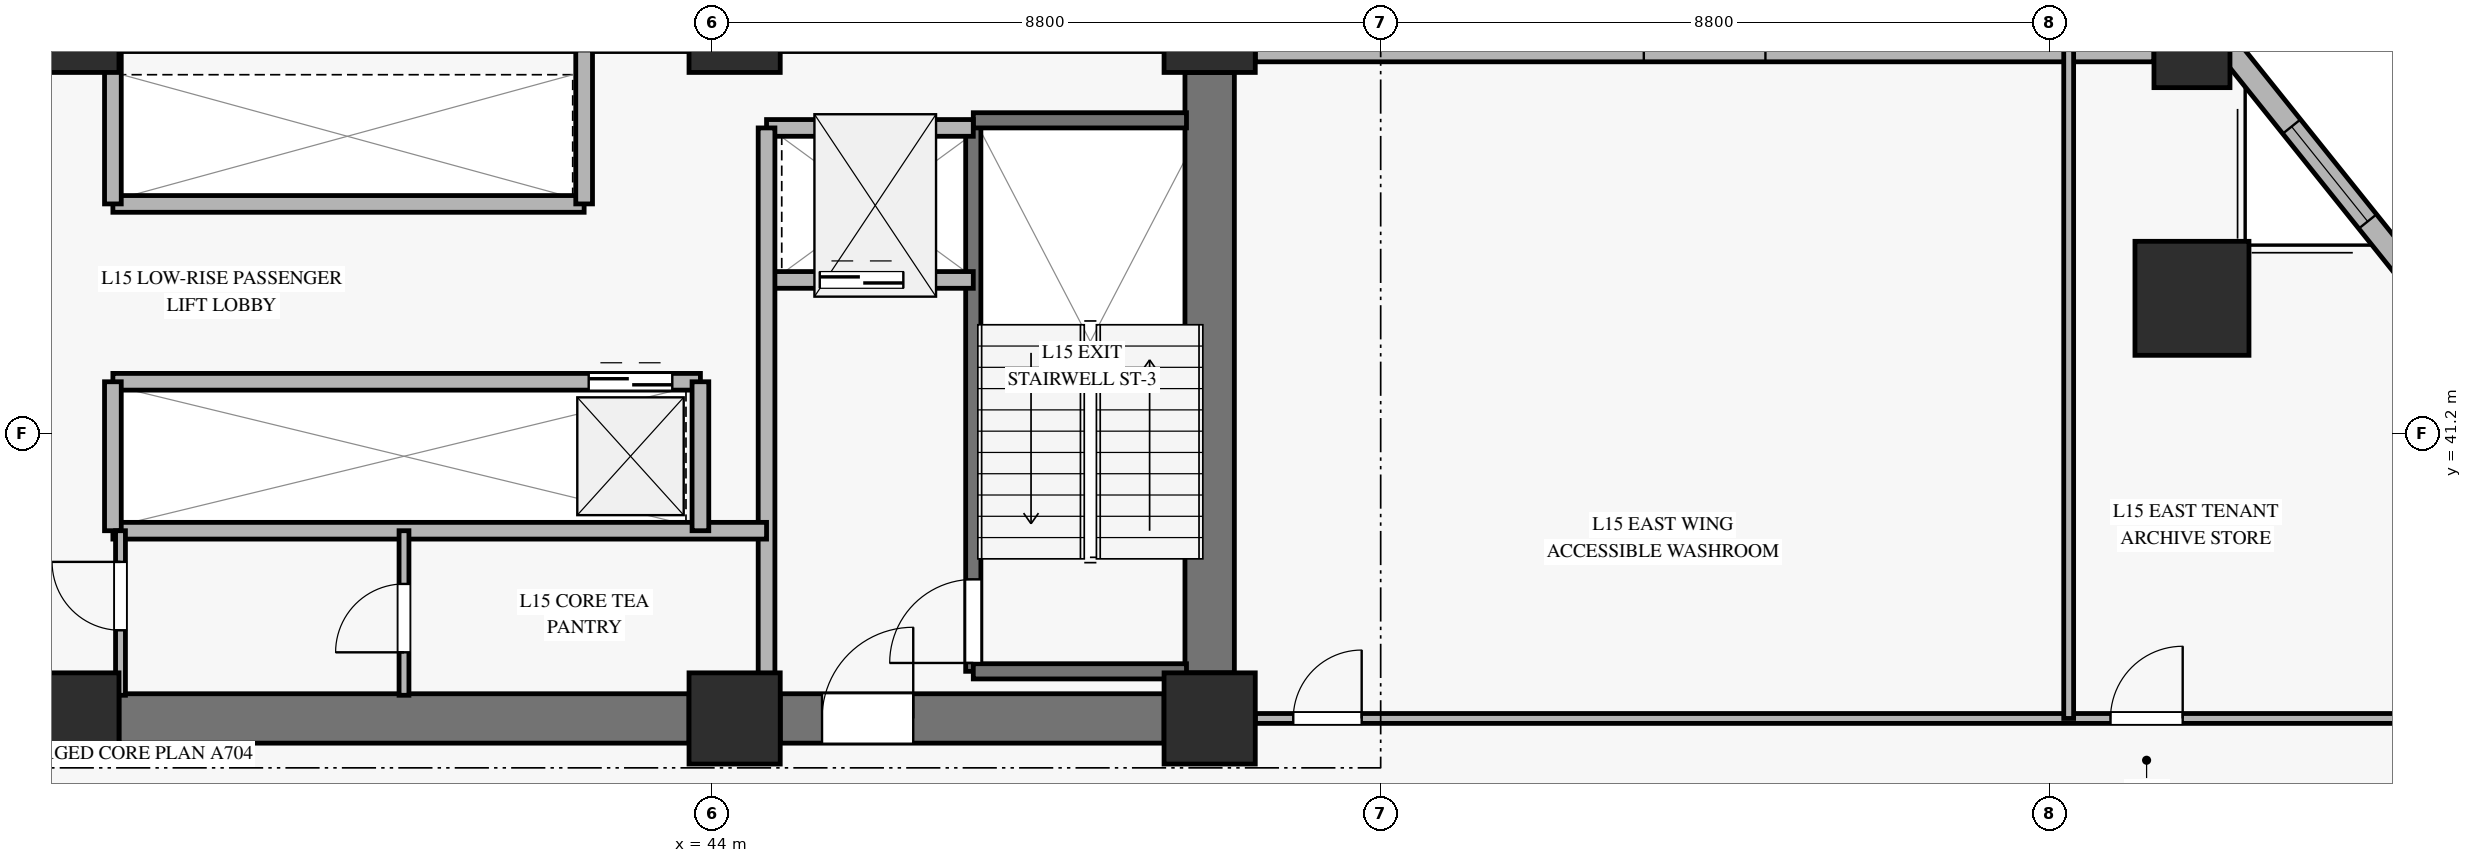
"""IFC4 building model, lengths in metres.
Left out: names, types, materials, properties, quantities, classifications, styles, units other than length and angle.
Written with IfcOpenShell. Run it as: python <this file> out.ifc"""

import sys

from ifc_helpers import new_model, si_unit, direction, frame, frame_2d, origin, origin_2d, place, context, subcontext, project, spatial, rectangle, hollow_rectangle, extrude, source, transform, mapped, element, fill, save


model = new_model("IFC4")
c1 = context("Model", 3, precision=1e-05, world=origin(), true_north=direction((0.0, 1.0)))
c2 = subcontext(c1, "Body", "Model", "MODEL_VIEW")
j1 = project(units=[si_unit("LENGTHUNIT", "METRE"), si_unit("PLANEANGLEUNIT", "RADIAN")], contexts=[c1])
p1 = place(None, origin())
s1 = spatial("IfcSite", under=j1, at=p1, CompositionType="ELEMENT")
p2 = place(p1, origin())
s2 = spatial("IfcBuilding", under=s1, at=p2, CompositionType="ELEMENT")
p3 = place(p2, frame((0.0, 0.0, 61.1)))
s3 = spatial("IfcBuildingStorey", under=s2, at=p3, CompositionType="ELEMENT", Elevation=61.1)
m1 = source(origin(), c2, "Body", "SweptSolid", [
    extrude(rectangle(XDim=1.2, YDim=1.2, at=origin_2d()), origin(), (0.0, 0.0, 1.0), 3.68),
])
for number, where, z_axis, x_axis in (
    (1, (35.6, 37.45, 0.0), (0.0, 0.0, 1.0), (1.0, 0.0, 0.0)),
    (2, (35.6, 46.55, 0.0), (0.0, 0.0, 1.0), (1.0, 0.0, 0.0)),
    (3, (44.3, 37.45, 0.0), (0.0, 0.0, 1.0), (1.0, 0.0, 0.0)),
    (4, (44.3, 46.55, 0.0), (0.0, 0.0, 1.0), (1.0, 0.0, 0.0)),
    (5, (50.55, 37.45, 0.0), (0.0, 0.0, 1.0), (1.0, 0.0, 0.0)),
    (6, (50.55, 46.55, 0.0), (0.0, 0.0, 1.0), (1.0, 0.0, 0.0)),
):
    element("IfcColumn", number, at=place(p3, frame(where, z_axis=z_axis, x_axis=x_axis)), inside=s3, PredefinedType="PILASTER", context=c2, shape_type="MappedRepresentation", body=[
        mapped(m1, transform((0.0, 0.0, 0.0), x_axis=(1.0, 0.0, 0.0), y_axis=(0.0, 1.0, 0.0), z_axis=(0.0, 0.0, 1.0), scale=1.0)),
    ])
p4 = place(p3, frame((36.2, 37.45, 0.0), z_axis=(0.0, 0.0, 1.0), x_axis=(1.0, 0.0, 0.0)))
e7 = element("IfcWall", 7, at=p4, inside=s3, PredefinedType="SHEAR", context=c2, shape_type="SweptSolid", body=[
    extrude(rectangle(XDim=7.5, YDim=0.65, at=frame_2d((3.75, 0.0))), origin(), (0.0, 0.0, 1.0), 3.68),
])
p5 = place(p3, frame((44.9, 37.45, 0.0), z_axis=(0.0, 0.0, 1.0), x_axis=(1.0, 0.0, 0.0)))
e8 = element("IfcWall", 8, at=p5, inside=s3, PredefinedType="SHEAR", context=c2, shape_type="SweptSolid", body=[
    extrude(rectangle(XDim=5.05, YDim=0.65, at=frame_2d((2.525, 0.0))), origin(), (0.0, 0.0, 1.0), 3.68),
])
p6 = place(p5, frame((0.55, 0.0, 0.0)))
e9 = element("IfcOpeningElement", 9, at=p6, cuts=e8, PredefinedType="OPENING", context=c2, shape_type="SweptSolid", body=[
    extrude(rectangle(XDim=1.2, YDim=2.15, at=frame_2d((0.6, 1.075))), frame((0.0, 0.335, 0.0), z_axis=(0.0, -1.0, 0.0), x_axis=(1.0, 0.0, 0.0)), (0.0, 0.0, 1.0), 0.67),
])
p7 = place(p3, frame((50.55, 38.05, 0.0), z_axis=(0.0, 0.0, 1.0), x_axis=(0.0, 1.0, 0.0)))
e10 = element("IfcWall", 10, at=p7, inside=s3, PredefinedType="SHEAR", context=c2, shape_type="SweptSolid", body=[
    extrude(rectangle(XDim=7.9, YDim=0.65, at=frame_2d((3.95, 0.0))), origin(), (0.0, 0.0, 1.0), 3.68),
])
m2 = source(origin(), c2, "Body", "SweptSolid", [
    extrude(hollow_rectangle(XDim=1.5, YDim=1.5, WallThickness=0.07, at=origin_2d()), origin(), (0.0, 0.0, 1.0), 3.68),
])
p8 = place(p3, frame((63.474, 42.978, 0.0), z_axis=(0.0, 0.0, 1.0), x_axis=(1.0, 0.0, 0.0)))
e11 = element("IfcColumn", 11, at=p8, inside=s3, PredefinedType="COLUMN", context=c2, shape_type="MappedRepresentation", body=[
    mapped(m2, transform((0.0, 0.0, 0.0), x_axis=(1.0, 0.0, 0.0), y_axis=(0.0, 1.0, 0.0), z_axis=(0.0, 0.0, 1.0), scale=1.0)),
])
m3 = source(origin(), c2, "Body", "SweptSolid", [
    extrude(hollow_rectangle(XDim=1.0, YDim=1.0, WallThickness=0.045, at=origin_2d()), origin(), (0.0, 0.0, 1.0), 3.68),
])
p9 = place(p3, frame((63.474, 46.25, 0.0), z_axis=(0.0, 0.0, 1.0), x_axis=(1.0, 0.0, 0.0)))
e12 = element("IfcColumn", 12, at=p9, inside=s3, PredefinedType="COLUMN", context=c2, shape_type="MappedRepresentation", body=[
    mapped(m3, transform((0.0, 0.0, 0.0), x_axis=(1.0, 0.0, 0.0), y_axis=(0.0, 1.0, 0.0), z_axis=(0.0, 0.0, 1.0), scale=1.0)),
])
p10 = place(p3, frame((51.15, 46.25, 0.0), z_axis=(0.0, 0.0, 1.0), x_axis=(1.0, 0.0, 0.0)))
e13 = element("IfcWall", 13, at=p10, inside=s3, PredefinedType="SOLIDWALL", context=c2, shape_type="SweptSolid", body=[
    extrude(rectangle(XDim=11.824, YDim=0.32, at=frame_2d((5.912, 0.0))), origin(), (0.0, 0.0, 1.0), 3.16),
])
p11 = place(p10, frame((5.112, 0.0, 0.45)))
e14 = element("IfcOpeningElement", 14, at=p11, cuts=e13, PredefinedType="OPENING", context=c2, shape_type="SweptSolid", body=[
    extrude(rectangle(XDim=1.6, YDim=2.0, at=frame_2d((0.8, 1.0))), frame((0.0, 0.17, 0.0), z_axis=(0.0, -1.0, 0.0), x_axis=(1.0, 0.0, 0.0)), (0.0, 0.0, 1.0), 0.34),
])
p12 = place(p3, frame((66.596, 42.978, 0.0), z_axis=(0.0, 0.0, 1.0), x_axis=(-0.625312639048, 0.780374335461, 0.0)))
e15 = element("IfcWall", 15, at=p12, inside=s3, PredefinedType="SOLIDWALL", context=c2, shape_type="SweptSolid", body=[
    extrude(rectangle(XDim=4.193, YDim=0.3, at=frame_2d((2.096, 0.0))), origin(), (0.0, 0.0, 1.0), 3.16),
])
p13 = place(p12, frame((1.296, 0.0, 0.45)))
e16 = element("IfcOpeningElement", 16, at=p13, cuts=e15, PredefinedType="OPENING", context=c2, shape_type="SweptSolid", body=[
    extrude(rectangle(XDim=1.6, YDim=2.0, at=frame_2d((0.8, 1.0))), frame((0.0, 0.16, 0.0), z_axis=(0.0, -1.0, 0.0), x_axis=(1.0, 0.0, 0.0)), (0.0, 0.0, 1.0), 0.32),
])
p14 = place(p3, frame((47.44, 38.07, 0.0), z_axis=(0.0, 0.0, 1.0), x_axis=(0.0, 1.0, 0.0)))
e17 = element("IfcWall", 17, at=p14, inside=s3, PredefinedType="SOLIDWALL", context=c2, shape_type="SweptSolid", body=[
    extrude(rectangle(XDim=7.25, YDim=0.2, at=frame_2d((3.625, 0.0))), origin(), (0.0, 0.0, 1.0), 3.9),
])
p15 = place(p14, frame((0.11, 0.0, 0.0)))
e18 = element("IfcOpeningElement", 18, at=p15, cuts=e17, PredefinedType="OPENING", context=c2, shape_type="SweptSolid", body=[
    extrude(rectangle(XDim=1.1, YDim=2.15, at=frame_2d((0.55, 1.075))), frame((0.0, 0.11, 0.0), z_axis=(0.0, -1.0, 0.0), x_axis=(1.0, 0.0, 0.0)), (0.0, 0.0, 1.0), 0.22),
])
for number, where, z_axis, x_axis in (
    (19, (47.44, 45.32, 0.0), (0.0, 0.0, 1.0), (1.0, 0.0, 0.0)),
    (20, (47.44, 38.07, 0.0), (0.0, 0.0, 1.0), (1.0, 0.0, 0.0)),
):
    element("IfcWall", number, at=place(p3, frame(where, z_axis=z_axis, x_axis=x_axis)), inside=s3, PredefinedType="SOLIDWALL", context=c2, shape_type="SweptSolid", body=[
        extrude(rectangle(XDim=2.805, YDim=0.2, at=frame_2d((1.403, 0.0))), origin(), (0.0, 0.0, 1.0), 3.9),
    ])
p16 = place(p3, frame((44.72, 43.22, 0.0), z_axis=(0.0, 0.0, 1.0), x_axis=(1.0, 0.0, 0.0)))
e21 = element("IfcWall", 21, at=p16, inside=s3, PredefinedType="SOLIDWALL", context=c2, shape_type="SweptSolid", body=[
    extrude(rectangle(XDim=2.72, YDim=0.22, at=frame_2d((1.36, 0.0))), origin(), (0.0, 0.0, 1.0), 3.68),
])
p17 = place(p16, frame((0.7, 0.0, 0.0)))
e22 = element("IfcOpeningElement", 22, at=p17, cuts=e21, PredefinedType="OPENING", context=c2, shape_type="SweptSolid", body=[
    extrude(rectangle(XDim=1.1, YDim=2.2, at=frame_2d((0.55, 1.1))), frame((0.0, 0.12, 0.0), z_axis=(0.0, -1.0, 0.0), x_axis=(1.0, 0.0, 0.0)), (0.0, 0.0, 1.0), 0.24),
])
p18 = place(p3, frame((44.72, 45.22, 0.0), z_axis=(0.0, 0.0, 1.0), x_axis=(1.0, 0.0, 0.0)))
e23 = element("IfcWall", 23, at=p18, inside=s3, PredefinedType="SOLIDWALL", context=c2, shape_type="SweptSolid", body=[
    extrude(rectangle(XDim=2.72, YDim=0.22, at=frame_2d((1.36, 0.0))), origin(), (0.0, 0.0, 1.0), 3.68),
])
p19 = place(p3, frame((44.72, 37.755, 0.0), z_axis=(0.0, 0.0, 1.0), x_axis=(0.0, 1.0, 0.0)))
e24 = element("IfcWall", 24, at=p19, inside=s3, PredefinedType="SOLIDWALL", context=c2, shape_type="SweptSolid", body=[
    extrude(rectangle(XDim=7.465, YDim=0.22, at=frame_2d((3.732, 0.0))), origin(), (0.0, 0.0, 1.0), 3.68),
])
p20 = place(p3, frame((36.12, 44.22, 0.0), z_axis=(0.0, 0.0, 1.0), x_axis=(1.0, 0.0, 0.0)))
e25 = element("IfcWall", 25, at=p20, inside=s3, PredefinedType="SOLIDWALL", context=c2, shape_type="SweptSolid", body=[
    extrude(rectangle(XDim=6.2, YDim=0.22, at=frame_2d((3.1, 0.0))), origin(), (0.0, 0.0, 1.0), 3.68),
])
for number, where, z_axis, x_axis in (
    (26, (36.12, 44.22, 0.0), (0.0, 0.0, 1.0), (0.0, 1.0, 0.0)),
    (27, (42.32, 44.22, 0.0), (0.0, 0.0, 1.0), (0.0, 1.0, 0.0)),
):
    element("IfcWall", number, at=place(p3, frame(where, z_axis=z_axis, x_axis=x_axis)), inside=s3, PredefinedType="SOLIDWALL", context=c2, shape_type="SweptSolid", body=[
        extrude(rectangle(XDim=2.025, YDim=0.22, at=frame_2d((1.013, 0.0))), origin(), (0.0, 0.0, 1.0), 3.68),
    ])
p21 = place(p3, frame((36.12, 41.88, 0.0), z_axis=(0.0, 0.0, 1.0), x_axis=(1.0, 0.0, 0.0)))
e28 = element("IfcWall", 28, at=p21, inside=s3, PredefinedType="SOLIDWALL", context=c2, shape_type="SweptSolid", body=[
    extrude(rectangle(XDim=7.73, YDim=0.22, at=frame_2d((3.865, 0.0))), origin(), (0.0, 0.0, 1.0), 3.68),
])
p22 = place(p21, frame((6.26, 0.0, 0.0)))
e29 = element("IfcOpeningElement", 29, at=p22, cuts=e28, PredefinedType="OPENING", context=c2, shape_type="SweptSolid", body=[
    extrude(rectangle(XDim=1.1, YDim=2.2, at=frame_2d((0.55, 1.1))), frame((0.0, 0.12, 0.0), z_axis=(0.0, -1.0, 0.0), x_axis=(1.0, 0.0, 0.0)), (0.0, 0.0, 1.0), 0.24),
])
p23 = place(p3, frame((36.12, 39.92, 0.0), z_axis=(0.0, 0.0, 1.0), x_axis=(1.0, 0.0, 0.0)))
e30 = element("IfcWall", 30, at=p23, inside=s3, PredefinedType="SOLIDWALL", context=c2, shape_type="SweptSolid", body=[
    extrude(rectangle(XDim=8.6, YDim=0.22, at=frame_2d((4.3, 0.0))), origin(), (0.0, 0.0, 1.0), 2.965),
])
for number, where, z_axis, x_axis in (
    (31, (36.12, 39.92, 0.0), (0.0, 0.0, 1.0), (0.0, 1.0, 0.0)),
    (32, (43.85, 39.92, 0.0), (0.0, 0.0, 1.0), (0.0, 1.0, 0.0)),
):
    element("IfcWall", number, at=place(p3, frame(where, z_axis=z_axis, x_axis=x_axis)), inside=s3, PredefinedType="SOLIDWALL", context=c2, shape_type="SweptSolid", body=[
        extrude(rectangle(XDim=1.96, YDim=0.22, at=frame_2d((0.98, 0.0))), origin(), (0.0, 0.0, 1.0), 3.68),
    ])
p24 = place(p3, frame((36.22, 37.755, 0.0), z_axis=(0.0, 0.0, 1.0), x_axis=(0.0, 1.0, 0.0)))
e33 = element("IfcWall", 33, at=p24, inside=s3, PredefinedType="PARTITIONING", context=c2, shape_type="SweptSolid", body=[
    extrude(rectangle(XDim=2.165, YDim=0.13, at=frame_2d((1.083, 0.0))), origin(), (0.0, 0.0, 1.0), 3.68),
])
p25 = place(p24, frame((0.855, 0.0, 0.0)))
e34 = element("IfcOpeningElement", 34, at=p25, cuts=e33, PredefinedType="OPENING", context=c2, shape_type="SweptSolid", body=[
    extrude(rectangle(XDim=0.9, YDim=2.1, at=frame_2d((0.45, 1.05))), frame((0.0, 0.075, 0.0), z_axis=(0.0, -1.0, 0.0), x_axis=(1.0, 0.0, 0.0)), (0.0, 0.0, 1.0), 0.15),
])
p26 = place(p3, frame((39.95, 37.755, 0.0), z_axis=(0.0, 0.0, 1.0), x_axis=(0.0, 1.0, 0.0)))
e35 = element("IfcWall", 35, at=p26, inside=s3, PredefinedType="PARTITIONING", context=c2, shape_type="SweptSolid", body=[
    extrude(rectangle(XDim=2.165, YDim=0.13, at=frame_2d((1.083, 0.0))), origin(), (0.0, 0.0, 1.0), 3.68),
])
p27 = place(p26, frame((0.565, 0.0, 0.0)))
e36 = element("IfcOpeningElement", 36, at=p27, cuts=e35, PredefinedType="OPENING", context=c2, shape_type="SweptSolid", body=[
    extrude(rectangle(XDim=0.9, YDim=2.1, at=frame_2d((0.45, 1.05))), frame((0.0, 0.075, 0.0), z_axis=(0.0, -1.0, 0.0), x_axis=(1.0, 0.0, 0.0)), (0.0, 0.0, 1.0), 0.15),
])
p28 = place(p3, frame((51.15, 37.45, 0.0), z_axis=(0.0, 0.0, 1.0), x_axis=(1.0, 0.0, 0.0)))
e37 = element("IfcWall", 37, at=p28, inside=s3, PredefinedType="PARTITIONING", context=c2, shape_type="SweptSolid", body=[
    extrude(rectangle(XDim=15.446, YDim=0.13, at=frame_2d((7.723, 0.0))), origin(), (0.0, 0.0, 1.0), 3.165),
])
p29 = place(p28, frame((0.5, 0.0, 0.0)))
e38 = element("IfcOpeningElement", 38, at=p29, cuts=e37, PredefinedType="OPENING", context=c2, shape_type="SweptSolid", body=[
    extrude(rectangle(XDim=0.9, YDim=2.1, at=frame_2d((0.45, 1.05))), frame((0.0, 0.075, 0.0), z_axis=(0.0, -1.0, 0.0), x_axis=(1.0, 0.0, 0.0)), (0.0, 0.0, 1.0), 0.15),
])
p30 = place(p28, frame((11.252, 0.0, 0.0)))
e39 = element("IfcOpeningElement", 39, at=p30, cuts=e37, PredefinedType="OPENING", context=c2, shape_type="SweptSolid", body=[
    extrude(rectangle(XDim=0.95, YDim=2.1, at=frame_2d((0.475, 1.05))), frame((0.0, 0.075, 0.0), z_axis=(0.0, -1.0, 0.0), x_axis=(1.0, 0.0, 0.0)), (0.0, 0.0, 1.0), 0.15),
])
p31 = place(p3, frame((61.852, 37.45, 0.0), z_axis=(0.0, 0.0, 1.0), x_axis=(0.0, 1.0, 0.0)))
e40 = element("IfcWall", 40, at=p31, inside=s3, PredefinedType="PARTITIONING", context=c2, shape_type="SweptSolid", body=[
    extrude(rectangle(XDim=8.8, YDim=0.13, at=frame_2d((4.4, 0.0))), origin(), (0.0, 0.0, 1.0), 3.68),
])
m4 = source(origin(), c2, "Body", "SweptSolid", [
    extrude(rectangle(XDim=1.6, YDim=2.0, at=frame_2d((0.8, 1.0))), frame((0.0, 0.03, 0.0), z_axis=(0.0, -1.0, 0.0), x_axis=(1.0, 0.0, 0.0)), (0.0, 0.0, 1.0), 0.06),
])
p32 = place(p13, origin())
e41 = element("IfcWindow", 41, at=p32, inside=s3, PartitioningType="SINGLE_PANEL", PredefinedType="WINDOW", context=c2, shape_type="MappedRepresentation", body=[
    mapped(m4, transform((0.0, 0.0, 0.0), x_axis=(1.0, 0.0, 0.0), y_axis=(0.0, 1.0, 0.0), z_axis=(0.0, 0.0, 1.0), scale=1.0)),
])
fill(e16, e41)
m5 = source(origin(), c2, "Body", "SweptSolid", [
    extrude(rectangle(XDim=1.1, YDim=2.15, at=frame_2d((0.55, 1.075))), frame((0.0, 0.025, 0.0), z_axis=(0.0, -1.0, 0.0), x_axis=(1.0, 0.0, 0.0)), (0.0, 0.0, 1.0), 0.05),
])
p33 = place(p15, origin())
e42 = element("IfcDoor", 42, at=p33, inside=s3, OperationType="SINGLE_SWING_LEFT", PredefinedType="DOOR", context=c2, shape_type="MappedRepresentation", body=[
    mapped(m5, transform((0.0, 0.0, 0.0), x_axis=(1.0, 0.0, 0.0), y_axis=(0.0, 1.0, 0.0), z_axis=(0.0, 0.0, 1.0), scale=1.0)),
])
fill(e18, e42)
m6 = source(origin(), c2, "Body", "SweptSolid", [
    extrude(rectangle(XDim=1.1, YDim=2.2, at=frame_2d((0.55, 1.1))), frame((0.0, 0.025, 0.0), z_axis=(0.0, -1.0, 0.0), x_axis=(1.0, 0.0, 0.0)), (0.0, 0.0, 1.0), 0.05),
])
p34 = place(p17, origin())
e43 = element("IfcDoor", 43, at=p34, inside=s3, OperationType="SLIDING_TO_LEFT", PredefinedType="DOOR", context=c2, shape_type="MappedRepresentation", body=[
    mapped(m6, transform((0.0, 0.0, 0.0), x_axis=(1.0, 0.0, 0.0), y_axis=(0.0, 1.0, 0.0), z_axis=(0.0, 0.0, 1.0), scale=1.0)),
])
fill(e22, e43)
m7 = source(origin(), c2, "Body", "SweptSolid", [
    extrude(rectangle(XDim=1.2, YDim=2.15, at=frame_2d((0.6, 1.075))), frame((0.0, 0.025, 0.0), z_axis=(0.0, -1.0, 0.0), x_axis=(1.0, 0.0, 0.0)), (0.0, 0.0, 1.0), 0.05),
])
p35 = place(p6, origin())
e44 = element("IfcDoor", 44, at=p35, inside=s3, OperationType="SINGLE_SWING_RIGHT", PredefinedType="DOOR", context=c2, shape_type="MappedRepresentation", body=[
    mapped(m7, transform((0.0, 0.0, 0.0), x_axis=(1.0, 0.0, 0.0), y_axis=(0.0, 1.0, 0.0), z_axis=(0.0, 0.0, 1.0), scale=1.0)),
])
fill(e9, e44)
p36 = place(p22, origin())
e45 = element("IfcDoor", 45, at=p36, inside=s3, OperationType="SLIDING_TO_LEFT", PredefinedType="DOOR", context=c2, shape_type="MappedRepresentation", body=[
    mapped(m6, transform((0.0, 0.0, 0.0), x_axis=(1.0, 0.0, 0.0), y_axis=(0.0, 1.0, 0.0), z_axis=(0.0, 0.0, 1.0), scale=1.0)),
])
fill(e29, e45)
m8 = source(origin(), c2, "Body", "SweptSolid", [
    extrude(rectangle(XDim=0.9, YDim=2.1, at=frame_2d((0.45, 1.05))), frame((0.0, 0.025, 0.0), z_axis=(0.0, -1.0, 0.0), x_axis=(1.0, 0.0, 0.0)), (0.0, 0.0, 1.0), 0.05),
])
p37 = place(p25, origin())
e46 = element("IfcDoor", 46, at=p37, inside=s3, OperationType="SINGLE_SWING_RIGHT", PredefinedType="DOOR", context=c2, shape_type="MappedRepresentation", body=[
    mapped(m8, transform((0.0, 0.0, 0.0), x_axis=(1.0, 0.0, 0.0), y_axis=(0.0, 1.0, 0.0), z_axis=(0.0, 0.0, 1.0), scale=1.0)),
])
fill(e34, e46)
p38 = place(p27, origin())
e47 = element("IfcDoor", 47, at=p38, inside=s3, OperationType="SINGLE_SWING_LEFT", PredefinedType="DOOR", context=c2, shape_type="MappedRepresentation", body=[
    mapped(m8, transform((0.0, 0.0, 0.0), x_axis=(1.0, 0.0, 0.0), y_axis=(0.0, 1.0, 0.0), z_axis=(0.0, 0.0, 1.0), scale=1.0)),
])
fill(e36, e47)
p39 = place(p29, origin())
e48 = element("IfcDoor", 48, at=p39, inside=s3, OperationType="SINGLE_SWING_RIGHT", PredefinedType="DOOR", context=c2, shape_type="MappedRepresentation", body=[
    mapped(m8, transform((0.0, 0.0, 0.0), x_axis=(1.0, 0.0, 0.0), y_axis=(0.0, 1.0, 0.0), z_axis=(0.0, 0.0, 1.0), scale=1.0)),
])
fill(e38, e48)
m9 = source(origin(), c2, "Body", "SweptSolid", [
    extrude(rectangle(XDim=0.95, YDim=2.1, at=frame_2d((0.475, 1.05))), frame((0.0, 0.025, 0.0), z_axis=(0.0, -1.0, 0.0), x_axis=(1.0, 0.0, 0.0)), (0.0, 0.0, 1.0), 0.05),
])
p40 = place(p30, origin())
e49 = element("IfcDoor", 49, at=p40, inside=s3, OperationType="SINGLE_SWING_RIGHT", PredefinedType="DOOR", context=c2, shape_type="MappedRepresentation", body=[
    mapped(m9, transform((0.0, 0.0, 0.0), x_axis=(1.0, 0.0, 0.0), y_axis=(0.0, 1.0, 0.0), z_axis=(0.0, 0.0, 1.0), scale=1.0)),
])
fill(e39, e49)
save(model, sys.argv[1])
